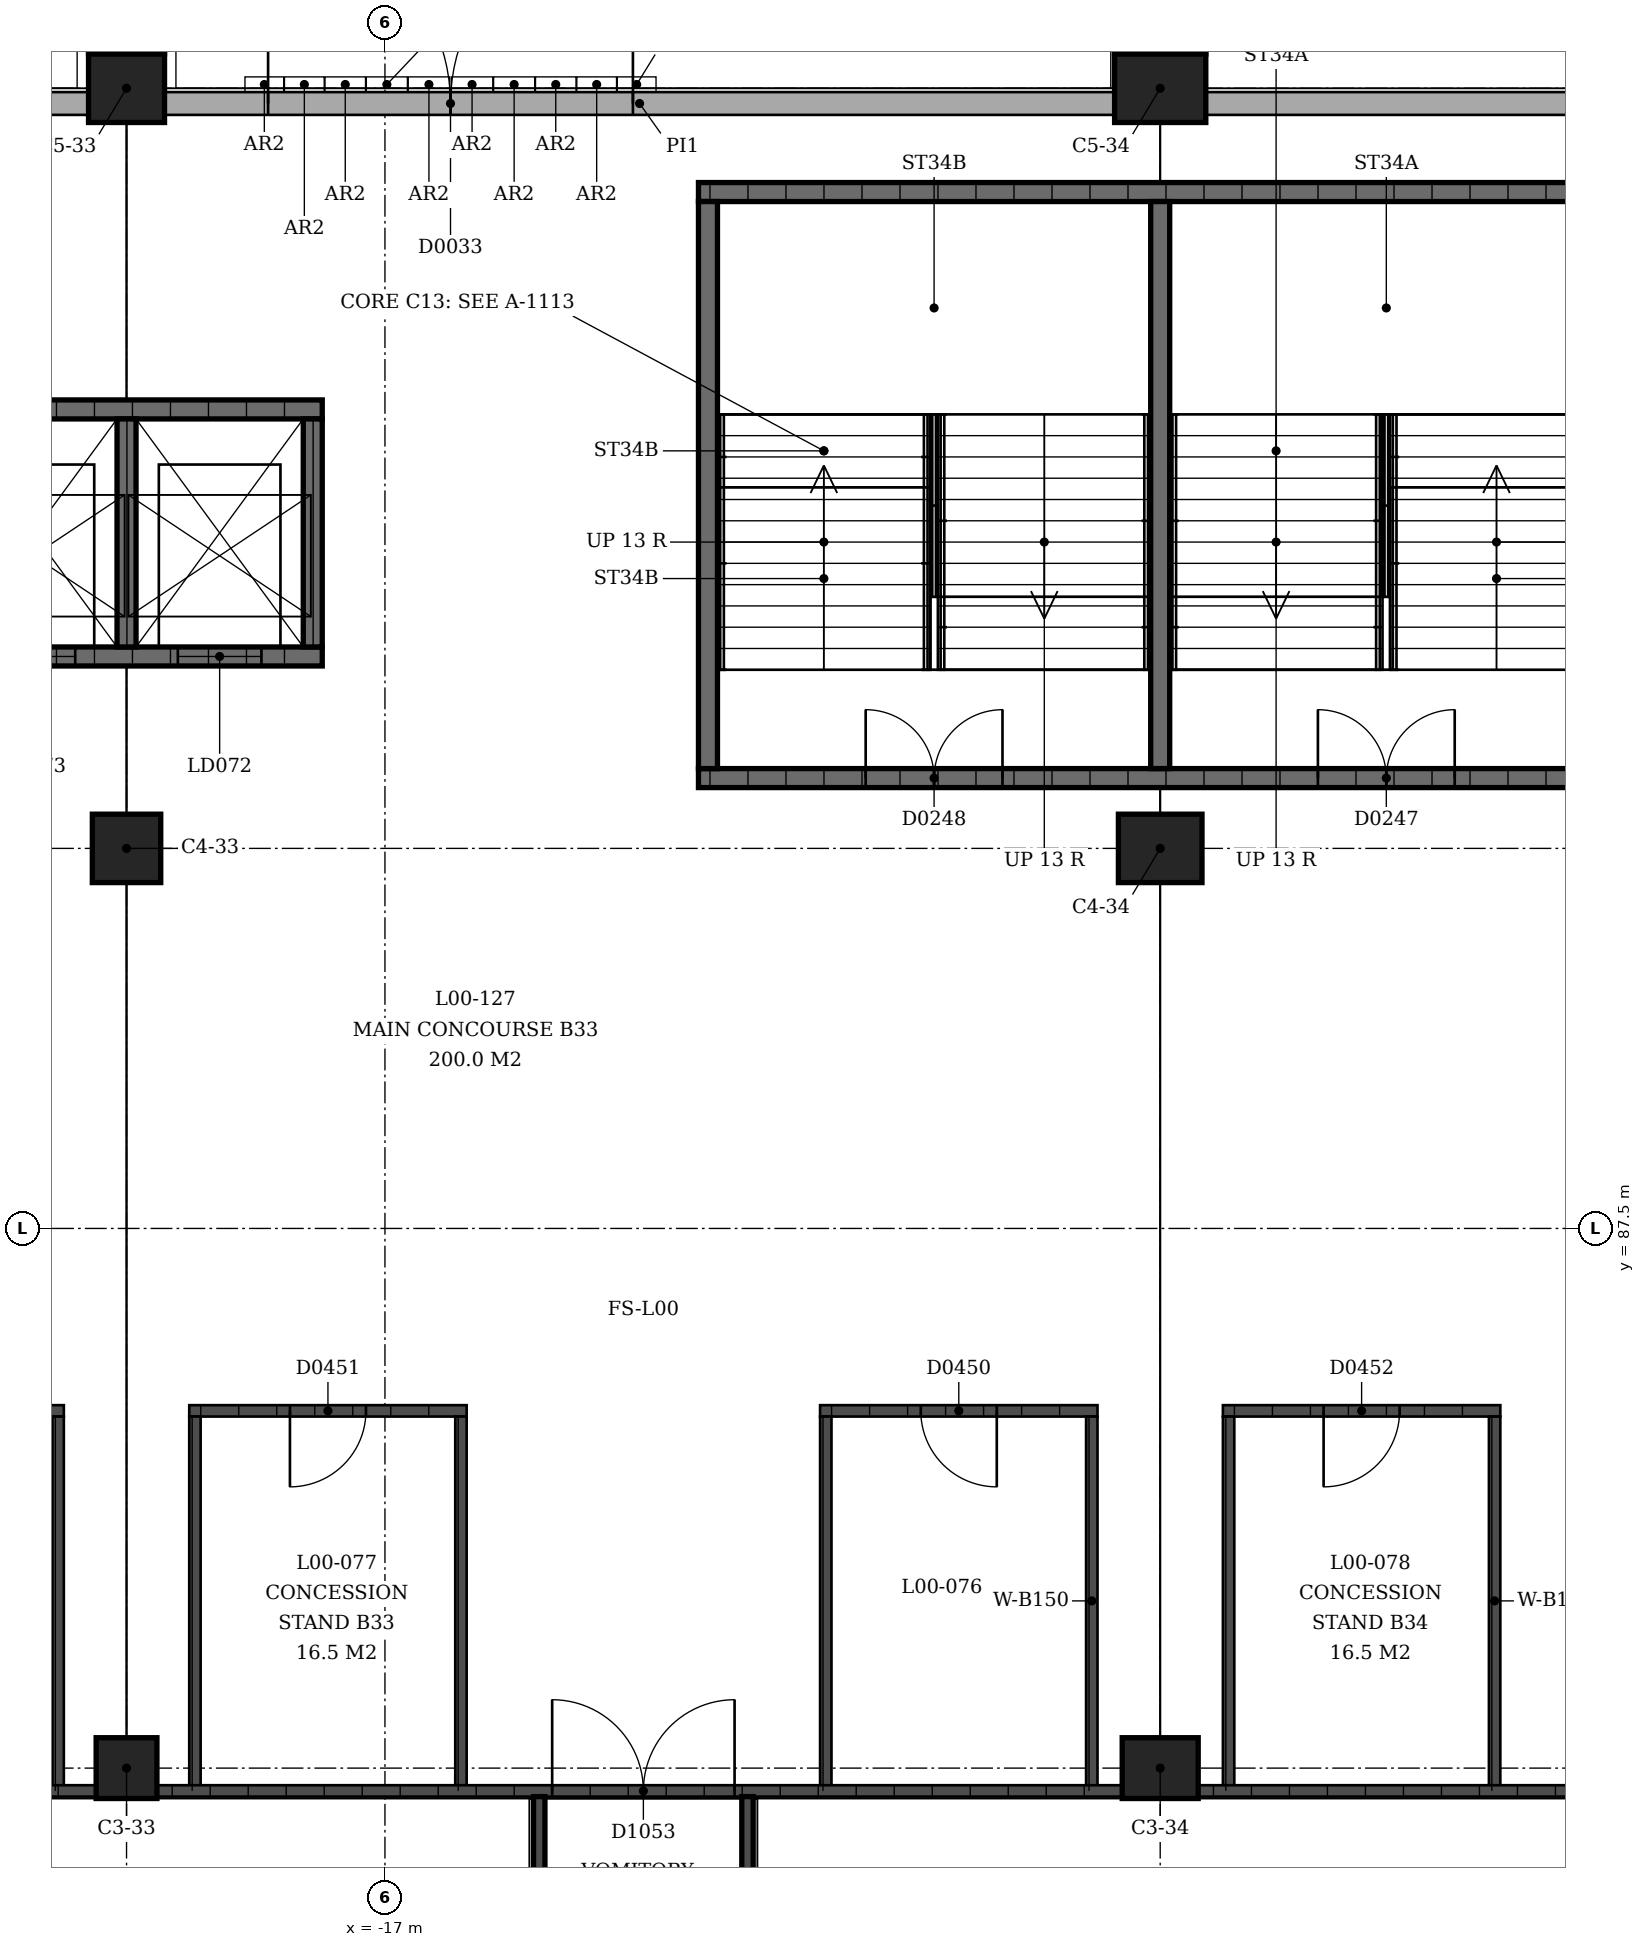
"""IFC4 building model, lengths in metres.
Left out: names, types, materials, properties, quantities, classifications, styles, units other than length and angle.
Written with IfcOpenShell. Run it as: python <this file> out.ifc"""

import sys

from ifc_helpers import new_model, si_unit, direction, frame, frame_2d, origin, origin_2d, place, context, subcontext, project, spatial, rectangle, extrude, element, fill, save


model = new_model("IFC4")
c1 = context("Model", 3, precision=1e-05, world=origin(), true_north=direction((0.0, 1.0)))
c2 = subcontext(c1, "Body", "Model", "MODEL_VIEW")
j1 = project(units=[si_unit("LENGTHUNIT", "METRE"), si_unit("PLANEANGLEUNIT", "RADIAN")], contexts=[c1])
p1 = place(None, origin())
s1 = spatial("IfcSite", under=j1, at=p1, CompositionType="ELEMENT")
p2 = place(p1, origin())
s2 = spatial("IfcBuilding", under=s1, at=p2, CompositionType="ELEMENT")
p3 = place(p2, origin())
s3 = spatial("IfcBuildingStorey", under=s2, at=p3, CompositionType="ELEMENT", Elevation=0.0)
p4 = place(p3, frame((-20.4, 80.4, 0.0), z_axis=(0.0, 0.0, 1.0), x_axis=(-1.0, 0.0, 0.0)))
e1 = element("IfcColumn", 1, at=p4, inside=s3, PredefinedType="COLUMN", context=c2, shape_type="SweptSolid", body=[
    extrude(rectangle(XDim=0.8, YDim=0.8, at=origin_2d()), origin(), (0.0, 0.0, 1.0), 4.5),
])
p5 = place(p3, frame((-20.4, 92.5, 0.0), z_axis=(0.0, 0.0, 1.0), x_axis=(-1.0, 0.0, 0.0)))
e2 = element("IfcColumn", 2, at=p5, inside=s3, PredefinedType="COLUMN", context=c2, shape_type="SweptSolid", body=[
    extrude(rectangle(XDim=0.9, YDim=0.9, at=origin_2d()), origin(), (0.0, 0.0, 1.0), 4.5),
])
p6 = place(p3, frame((-20.4, 102.5, 0.0), z_axis=(0.0, 0.0, 1.0), x_axis=(-1.0, 0.0, 0.0)))
e3 = element("IfcColumn", 3, at=p6, inside=s3, PredefinedType="COLUMN", context=c2, shape_type="SweptSolid", body=[
    extrude(rectangle(XDim=1.0, YDim=0.9, at=origin_2d()), origin(), (0.0, 0.0, 1.0), 4.5),
])
p7 = place(p3, frame((-6.8, 80.4, 0.0), z_axis=(0.0, 0.0, 1.0), x_axis=(-1.0, 0.0, 0.0)))
e4 = element("IfcColumn", 4, at=p7, inside=s3, PredefinedType="COLUMN", context=c2, shape_type="SweptSolid", body=[
    extrude(rectangle(XDim=1.0, YDim=0.8, at=origin_2d()), origin(), (0.0, 0.0, 1.0), 4.5),
])
p8 = place(p3, frame((-6.8, 92.5, 0.0), z_axis=(0.0, 0.0, 1.0), x_axis=(-1.0, 0.0, 0.0)))
e5 = element("IfcColumn", 5, at=p8, inside=s3, PredefinedType="COLUMN", context=c2, shape_type="SweptSolid", body=[
    extrude(rectangle(XDim=1.1, YDim=0.9, at=origin_2d()), origin(), (0.0, 0.0, 1.0), 4.5),
])
p9 = place(p3, frame((-6.8, 102.5, 0.0), z_axis=(0.0, 0.0, 1.0), x_axis=(-1.0, 0.0, 0.0)))
e6 = element("IfcColumn", 6, at=p9, inside=s3, PredefinedType="COLUMN", context=c2, shape_type="SweptSolid", body=[
    extrude(rectangle(XDim=1.2, YDim=0.9, at=origin_2d()), origin(), (0.0, 0.0, 1.0), 4.5),
])
p10 = place(p3, frame((-33.4, 102.3, 0.0), z_axis=(0.0, 0.0, 1.0), x_axis=(1.0, 0.0, 0.0)))
e7 = element("IfcWall", 7, at=p10, inside=s3, PredefinedType="SOLIDWALL", context=c2, shape_type="SweptSolid", body=[
    extrude(rectangle(XDim=12.5, YDim=0.3, at=frame_2d((6.25, 0.0))), origin(), (0.0, 0.0, 1.0), 3.09),
])
p11 = place(p10, frame((7.238, 0.0, 0.0)))
e8 = element("IfcOpeningElement", 8, at=p11, cuts=e7, PredefinedType="OPENING", context=c2, shape_type="SweptSolid", body=[
    extrude(rectangle(XDim=3.0, YDim=2.4, at=frame_2d((1.5, 1.2))), frame((0.0, 0.16, 0.0), z_axis=(0.0, -1.0, 0.0), x_axis=(1.0, 0.0, 0.0)), (0.0, 0.0, 1.0), 0.32),
])
p12 = place(p3, frame((-19.9, 102.3, 0.0), z_axis=(0.0, 0.0, 1.0), x_axis=(1.0, 0.0, 0.0)))
e9 = element("IfcWall", 9, at=p12, inside=s3, PredefinedType="SOLIDWALL", context=c2, shape_type="SweptSolid", body=[
    extrude(rectangle(XDim=12.5, YDim=0.3, at=frame_2d((6.25, 0.0))), origin(), (0.0, 0.0, 1.0), 3.09),
])
p13 = place(p12, frame((1.363, 0.0, 0.0)))
e10 = element("IfcOpeningElement", 10, at=p13, cuts=e9, PredefinedType="OPENING", context=c2, shape_type="SweptSolid", body=[
    extrude(rectangle(XDim=4.8, YDim=2.4, at=frame_2d((2.4, 1.2))), frame((0.0, 0.16, 0.0), z_axis=(0.0, -1.0, 0.0), x_axis=(1.0, 0.0, 0.0)), (0.0, 0.0, 1.0), 0.32),
])
p14 = place(p3, frame((-6.2, 102.3, 0.0), z_axis=(0.0, 0.0, 1.0), x_axis=(1.0, 0.0, 0.0)))
e11 = element("IfcWall", 11, at=p14, inside=s3, PredefinedType="SOLIDWALL", context=c2, shape_type="SweptSolid", body=[
    extrude(rectangle(XDim=12.5, YDim=0.3, at=frame_2d((6.25, 0.0))), origin(), (0.0, 0.0, 1.0), 3.09),
])
p15 = place(p3, frame((-0.725, 93.425, 0.0), z_axis=(0.0, 0.0, 1.0), x_axis=(-1.0, 0.0, 0.0)))
e12 = element("IfcWall", 12, at=p15, inside=s3, PredefinedType="SHEAR", context=c2, shape_type="SweptSolid", body=[
    extrude(rectangle(XDim=12.15, YDim=0.25, at=frame_2d((6.075, 0.0))), origin(), (0.0, 0.0, 1.0), 4.09),
])
p16 = place(p15, frame((2.2, 0.0, 0.0)))
e13 = element("IfcOpeningElement", 13, at=p16, cuts=e12, PredefinedType="OPENING", context=c2, shape_type="SweptSolid", body=[
    extrude(rectangle(XDim=1.8, YDim=2.1, at=frame_2d((0.9, 1.05))), frame((0.0, 0.125, 0.0), z_axis=(0.0, -1.0, 0.0), x_axis=(1.0, 0.0, 0.0)), (0.0, 0.0, 1.0), 0.25),
])
p17 = place(p15, frame((8.15, 0.0, 0.0)))
e14 = element("IfcOpeningElement", 14, at=p17, cuts=e12, PredefinedType="OPENING", context=c2, shape_type="SweptSolid", body=[
    extrude(rectangle(XDim=1.8, YDim=2.1, at=frame_2d((0.9, 1.05))), frame((0.0, 0.125, 0.0), z_axis=(0.0, -1.0, 0.0), x_axis=(1.0, 0.0, 0.0)), (0.0, 0.0, 1.0), 0.25),
])
p18 = place(p3, frame((-0.725, 101.135, 0.0), z_axis=(0.0, 0.0, 1.0), x_axis=(-1.0, 0.0, 0.0)))
e15 = element("IfcWall", 15, at=p18, inside=s3, PredefinedType="SHEAR", context=c2, shape_type="SweptSolid", body=[
    extrude(rectangle(XDim=12.15, YDim=0.25, at=frame_2d((6.075, 0.0))), origin(), (0.0, 0.0, 1.0), 4.09),
])
for number, where, z_axis, x_axis in (
    (16, (-12.75, 93.55, 0.0), (0.0, 0.0, 1.0), (0.0, 1.0, 0.0)),
    (17, (-6.8, 93.55, 0.0), (0.0, 0.0, 1.0), (0.0, 1.0, 0.0)),
):
    element("IfcWall", number, at=place(p3, frame(where, z_axis=z_axis, x_axis=x_axis)), inside=s3, PredefinedType="SHEAR", context=c2, shape_type="SweptSolid", body=[
        extrude(rectangle(XDim=7.46, YDim=0.25, at=frame_2d((3.73, 0.0))), origin(), (0.0, 0.0, 1.0), 4.09),
    ])
p19 = place(p3, frame((-17.825, 95.025, 0.0), z_axis=(0.0, 0.0, 1.0), x_axis=(-1.0, 0.0, 0.0)))
e18 = element("IfcWall", 18, at=p19, inside=s3, PredefinedType="SHEAR", context=c2, shape_type="SweptSolid", body=[
    extrude(rectangle(XDim=5.15, YDim=0.25, at=frame_2d((2.575, 0.0))), origin(), (0.0, 0.0, 1.0), 4.09),
])
p20 = place(p19, frame((0.8, 0.0, 0.0)))
e19 = element("IfcOpeningElement", 19, at=p20, cuts=e18, PredefinedType="OPENING", context=c2, shape_type="SweptSolid", body=[
    extrude(rectangle(XDim=1.1, YDim=2.1, at=frame_2d((0.55, 1.05))), frame((0.0, 0.125, 0.0), z_axis=(0.0, -1.0, 0.0), x_axis=(1.0, 0.0, 0.0)), (0.0, 0.0, 1.0), 0.25),
])
p21 = place(p19, frame((3.25, 0.0, 0.0)))
e20 = element("IfcOpeningElement", 20, at=p21, cuts=e18, PredefinedType="OPENING", context=c2, shape_type="SweptSolid", body=[
    extrude(rectangle(XDim=1.1, YDim=2.1, at=frame_2d((0.55, 1.05))), frame((0.0, 0.125, 0.0), z_axis=(0.0, -1.0, 0.0), x_axis=(1.0, 0.0, 0.0)), (0.0, 0.0, 1.0), 0.25),
])
p22 = place(p3, frame((-17.825, 98.275, 0.0), z_axis=(0.0, 0.0, 1.0), x_axis=(-1.0, 0.0, 0.0)))
e21 = element("IfcWall", 21, at=p22, inside=s3, PredefinedType="SHEAR", context=c2, shape_type="SweptSolid", body=[
    extrude(rectangle(XDim=5.15, YDim=0.25, at=frame_2d((2.575, 0.0))), origin(), (0.0, 0.0, 1.0), 4.09),
])
for number, where, z_axis, x_axis in (
    (22, (-17.95, 95.15, 0.0), (0.0, 0.0, 1.0), (0.0, 1.0, 0.0)),
    (23, (-20.4, 95.15, 0.0), (0.0, 0.0, 1.0), (0.0, 1.0, 0.0)),
):
    element("IfcWall", number, at=place(p3, frame(where, z_axis=z_axis, x_axis=x_axis)), inside=s3, PredefinedType="SHEAR", context=c2, shape_type="SweptSolid", body=[
        extrude(rectangle(XDim=3.0, YDim=0.25, at=frame_2d((1.5, 0.0))), origin(), (0.0, 0.0, 1.0), 4.09),
    ])
p23 = place(p3, frame((-24.875, 85.1, 0.0), z_axis=(0.0, 0.0, 1.0), x_axis=(1.0, 0.0, 0.0)))
e24 = element("IfcWall", 24, at=p23, inside=s3, PredefinedType="SOLIDWALL", context=c2, shape_type="SweptSolid", body=[
    extrude(rectangle(XDim=3.65, YDim=0.15, at=frame_2d((1.825, 0.0))), origin(), (0.0, 0.0, 1.0), 3.0),
])
p24 = place(p23, frame((1.325, 0.0, 0.0)))
e25 = element("IfcOpeningElement", 25, at=p24, cuts=e24, PredefinedType="OPENING", context=c2, shape_type="SweptSolid", body=[
    extrude(rectangle(XDim=1.0, YDim=2.1, at=frame_2d((0.5, 1.05))), frame((0.0, 0.075, 0.0), z_axis=(0.0, -1.0, 0.0), x_axis=(1.0, 0.0, 0.0)), (0.0, 0.0, 1.0), 0.15),
])
p25 = place(p3, frame((-21.3, 80.1, 0.0), z_axis=(0.0, 0.0, 1.0), x_axis=(0.0, 1.0, 0.0)))
e26 = element("IfcWall", 26, at=p25, inside=s3, PredefinedType="SOLIDWALL", context=c2, shape_type="SweptSolid", body=[
    extrude(rectangle(XDim=4.925, YDim=0.15, at=frame_2d((2.462, 0.0))), origin(), (0.0, 0.0, 1.0), 3.0),
])
p26 = place(p3, frame((-7.625, 85.1, 0.0), z_axis=(0.0, 0.0, 1.0), x_axis=(-1.0, 0.0, 0.0)))
e27 = element("IfcWall", 27, at=p26, inside=s3, PredefinedType="SOLIDWALL", context=c2, shape_type="SweptSolid", body=[
    extrude(rectangle(XDim=3.65, YDim=0.15, at=frame_2d((1.825, 0.0))), origin(), (0.0, 0.0, 1.0), 3.0),
])
p27 = place(p26, frame((1.325, 0.0, 0.0)))
e28 = element("IfcOpeningElement", 28, at=p27, cuts=e27, PredefinedType="OPENING", context=c2, shape_type="SweptSolid", body=[
    extrude(rectangle(XDim=1.0, YDim=2.1, at=frame_2d((0.5, 1.05))), frame((0.0, 0.075, 0.0), z_axis=(0.0, -1.0, 0.0), x_axis=(1.0, 0.0, 0.0)), (0.0, 0.0, 1.0), 0.15),
])
for number, where, z_axis, x_axis in (
    (29, (-7.7, 80.1, 0.0), (0.0, 0.0, 1.0), (0.0, 1.0, 0.0)),
    (30, (-11.2, 80.1, 0.0), (0.0, 0.0, 1.0), (0.0, 1.0, 0.0)),
):
    element("IfcWall", number, at=place(p3, frame(where, z_axis=z_axis, x_axis=x_axis)), inside=s3, PredefinedType="SOLIDWALL", context=c2, shape_type="SweptSolid", body=[
        extrude(rectangle(XDim=4.925, YDim=0.15, at=frame_2d((2.462, 0.0))), origin(), (0.0, 0.0, 1.0), 3.0),
    ])
p28 = place(p3, frame((-15.925, 85.1, 0.0), z_axis=(0.0, 0.0, 1.0), x_axis=(-1.0, 0.0, 0.0)))
e31 = element("IfcWall", 31, at=p28, inside=s3, PredefinedType="SOLIDWALL", context=c2, shape_type="SweptSolid", body=[
    extrude(rectangle(XDim=3.65, YDim=0.15, at=frame_2d((1.825, 0.0))), origin(), (0.0, 0.0, 1.0), 3.0),
])
p29 = place(p28, frame((1.325, 0.0, 0.0)))
e32 = element("IfcOpeningElement", 32, at=p29, cuts=e31, PredefinedType="OPENING", context=c2, shape_type="SweptSolid", body=[
    extrude(rectangle(XDim=1.0, YDim=2.1, at=frame_2d((0.5, 1.05))), frame((0.0, 0.075, 0.0), z_axis=(0.0, -1.0, 0.0), x_axis=(1.0, 0.0, 0.0)), (0.0, 0.0, 1.0), 0.15),
])
for number, where, z_axis, x_axis in (
    (33, (-16.0, 80.1, 0.0), (0.0, 0.0, 1.0), (0.0, 1.0, 0.0)),
    (34, (-19.5, 80.1, 0.0), (0.0, 0.0, 1.0), (0.0, 1.0, 0.0)),
):
    element("IfcWall", number, at=place(p3, frame(where, z_axis=z_axis, x_axis=x_axis)), inside=s3, PredefinedType="SOLIDWALL", context=c2, shape_type="SweptSolid", body=[
        extrude(rectangle(XDim=4.925, YDim=0.15, at=frame_2d((2.462, 0.0))), origin(), (0.0, 0.0, 1.0), 3.0),
    ])
p30 = place(p3, frame((-5.975, 85.1, 0.0), z_axis=(0.0, 0.0, 1.0), x_axis=(1.0, 0.0, 0.0)))
e35 = element("IfcWall", 35, at=p30, inside=s3, PredefinedType="SOLIDWALL", context=c2, shape_type="SweptSolid", body=[
    extrude(rectangle(XDim=3.65, YDim=0.15, at=frame_2d((1.825, 0.0))), origin(), (0.0, 0.0, 1.0), 3.0),
])
p31 = place(p30, frame((1.325, 0.0, 0.0)))
e36 = element("IfcOpeningElement", 36, at=p31, cuts=e35, PredefinedType="OPENING", context=c2, shape_type="SweptSolid", body=[
    extrude(rectangle(XDim=1.0, YDim=2.1, at=frame_2d((0.5, 1.05))), frame((0.0, 0.075, 0.0), z_axis=(0.0, -1.0, 0.0), x_axis=(1.0, 0.0, 0.0)), (0.0, 0.0, 1.0), 0.15),
])
for number, where, z_axis, x_axis in (
    (37, (-5.9, 80.1, 0.0), (0.0, 0.0, 1.0), (0.0, 1.0, 0.0)),
    (38, (-2.4, 80.1, 0.0), (0.0, 0.0, 1.0), (0.0, 1.0, 0.0)),
):
    element("IfcWall", number, at=place(p3, frame(where, z_axis=z_axis, x_axis=x_axis)), inside=s3, PredefinedType="SOLIDWALL", context=c2, shape_type="SweptSolid", body=[
        extrude(rectangle(XDim=4.925, YDim=0.15, at=frame_2d((2.462, 0.0))), origin(), (0.0, 0.0, 1.0), 3.0),
    ])
p32 = place(p3, frame((-33.5, 80.1, 0.0), z_axis=(0.0, 0.0, 1.0), x_axis=(1.0, 0.0, 0.0)))
e39 = element("IfcWall", 39, at=p32, inside=s3, PredefinedType="SOLIDWALL", context=c2, shape_type="SweptSolid", body=[
    extrude(rectangle(XDim=12.7, YDim=0.15, at=frame_2d((6.35, 0.0))), origin(), (0.0, 0.0, 1.0), 3.0),
])
p33 = place(p3, frame((-20.0, 80.1, 0.0), z_axis=(0.0, 0.0, 1.0), x_axis=(1.0, 0.0, 0.0)))
e40 = element("IfcWall", 40, at=p33, inside=s3, PredefinedType="SOLIDWALL", context=c2, shape_type="SweptSolid", body=[
    extrude(rectangle(XDim=12.7, YDim=0.15, at=frame_2d((6.35, 0.0))), origin(), (0.0, 0.0, 1.0), 3.0),
])
p34 = place(p33, frame((5.2, 0.0, 0.0)))
e41 = element("IfcOpeningElement", 41, at=p34, cuts=e40, PredefinedType="OPENING", context=c2, shape_type="SweptSolid", body=[
    extrude(rectangle(XDim=2.4, YDim=2.4, at=frame_2d((1.2, 1.2))), frame((0.0, 0.075, 0.0), z_axis=(0.0, -1.0, 0.0), x_axis=(1.0, 0.0, 0.0)), (0.0, 0.0, 1.0), 0.15),
])
p35 = place(p3, frame((-6.3, 80.1, 0.0), z_axis=(0.0, 0.0, 1.0), x_axis=(1.0, 0.0, 0.0)))
e42 = element("IfcWall", 42, at=p35, inside=s3, PredefinedType="SOLIDWALL", context=c2, shape_type="SweptSolid", body=[
    extrude(rectangle(XDim=12.7, YDim=0.15, at=frame_2d((6.35, 0.0))), origin(), (0.0, 0.0, 1.0), 3.0),
])
for number, where, z_axis, x_axis in (
    (43, (-12.23, 75.3, 0.0), (0.0, 0.0, 1.0), (0.0, 1.0, 0.0)),
    (44, (-14.97, 75.3, 0.0), (0.0, 0.0, 1.0), (0.0, 1.0, 0.0)),
):
    element("IfcWall", number, at=place(p3, frame(where, z_axis=z_axis, x_axis=x_axis)), inside=s3, PredefinedType="SOLIDWALL", context=c2, shape_type="SweptSolid", body=[
        extrude(rectangle(XDim=4.725, YDim=0.15, at=frame_2d((2.362, 0.0))), origin(), (0.0, 0.0, 1.0), 2.75),
    ])
p36 = place(p13, origin())
e45 = element("IfcDoor", 45, at=p36, inside=s3, OperationType="DOUBLE_DOOR_SINGLE_SWING", PredefinedType="DOOR", context=c2, shape_type="SweptSolid", body=[
    extrude(rectangle(XDim=4.8, YDim=2.4, at=frame_2d((2.4, 1.2))), frame((0.0, 0.025, 0.0), z_axis=(0.0, -1.0, 0.0), x_axis=(1.0, 0.0, 0.0)), (0.0, 0.0, 1.0), 0.05),
])
fill(e10, e45)
p37 = place(p16, origin())
e46 = element("IfcDoor", 46, at=p37, inside=s3, OperationType="DOUBLE_DOOR_SINGLE_SWING", PredefinedType="DOOR", context=c2, shape_type="SweptSolid", body=[
    extrude(rectangle(XDim=1.8, YDim=2.1, at=frame_2d((0.9, 1.05))), frame((0.0, 0.025, 0.0), z_axis=(0.0, -1.0, 0.0), x_axis=(1.0, 0.0, 0.0)), (0.0, 0.0, 1.0), 0.05),
])
fill(e13, e46)
p38 = place(p17, origin())
e47 = element("IfcDoor", 47, at=p38, inside=s3, OperationType="DOUBLE_DOOR_SINGLE_SWING", PredefinedType="DOOR", context=c2, shape_type="SweptSolid", body=[
    extrude(rectangle(XDim=1.8, YDim=2.1, at=frame_2d((0.9, 1.05))), frame((0.0, 0.025, 0.0), z_axis=(0.0, -1.0, 0.0), x_axis=(1.0, 0.0, 0.0)), (0.0, 0.0, 1.0), 0.05),
])
fill(e14, e47)
p39 = place(p20, origin())
e48 = element("IfcDoor", 48, at=p39, inside=s3, OperationType="SLIDING_TO_LEFT", PredefinedType="DOOR", context=c2, shape_type="SweptSolid", body=[
    extrude(rectangle(XDim=1.1, YDim=2.1, at=frame_2d((0.55, 1.05))), frame((0.0, 0.025, 0.0), z_axis=(0.0, -1.0, 0.0), x_axis=(1.0, 0.0, 0.0)), (0.0, 0.0, 1.0), 0.05),
])
fill(e19, e48)
p40 = place(p21, origin())
e49 = element("IfcDoor", 49, at=p40, inside=s3, OperationType="SLIDING_TO_LEFT", PredefinedType="DOOR", context=c2, shape_type="SweptSolid", body=[
    extrude(rectangle(XDim=1.1, YDim=2.1, at=frame_2d((0.55, 1.05))), frame((0.0, 0.025, 0.0), z_axis=(0.0, -1.0, 0.0), x_axis=(1.0, 0.0, 0.0)), (0.0, 0.0, 1.0), 0.05),
])
fill(e20, e49)
p41 = place(p27, origin())
e50 = element("IfcDoor", 50, at=p41, inside=s3, OperationType="SINGLE_SWING_RIGHT", PredefinedType="DOOR", context=c2, shape_type="SweptSolid", body=[
    extrude(rectangle(XDim=1.0, YDim=2.1, at=frame_2d((0.5, 1.05))), frame((0.0, 0.025, 0.0), z_axis=(0.0, -1.0, 0.0), x_axis=(1.0, 0.0, 0.0)), (0.0, 0.0, 1.0), 0.05),
])
fill(e28, e50)
p42 = place(p29, origin())
e51 = element("IfcDoor", 51, at=p42, inside=s3, OperationType="SINGLE_SWING_LEFT", PredefinedType="DOOR", context=c2, shape_type="SweptSolid", body=[
    extrude(rectangle(XDim=1.0, YDim=2.1, at=frame_2d((0.5, 1.05))), frame((0.0, 0.025, 0.0), z_axis=(0.0, -1.0, 0.0), x_axis=(1.0, 0.0, 0.0)), (0.0, 0.0, 1.0), 0.05),
])
fill(e32, e51)
p43 = place(p31, origin())
e52 = element("IfcDoor", 52, at=p43, inside=s3, OperationType="SINGLE_SWING_LEFT", PredefinedType="DOOR", context=c2, shape_type="SweptSolid", body=[
    extrude(rectangle(XDim=1.0, YDim=2.1, at=frame_2d((0.5, 1.05))), frame((0.0, 0.025, 0.0), z_axis=(0.0, -1.0, 0.0), x_axis=(1.0, 0.0, 0.0)), (0.0, 0.0, 1.0), 0.05),
])
fill(e36, e52)
p44 = place(p34, origin())
e53 = element("IfcDoor", 53, at=p44, inside=s3, OperationType="DOUBLE_DOOR_SINGLE_SWING", PredefinedType="DOOR", context=c2, shape_type="SweptSolid", body=[
    extrude(rectangle(XDim=2.4, YDim=2.4, at=frame_2d((1.2, 1.2))), frame((0.0, 0.025, 0.0), z_axis=(0.0, -1.0, 0.0), x_axis=(1.0, 0.0, 0.0)), (0.0, 0.0, 1.0), 0.05),
])
fill(e41, e53)
save(model, sys.argv[1])
